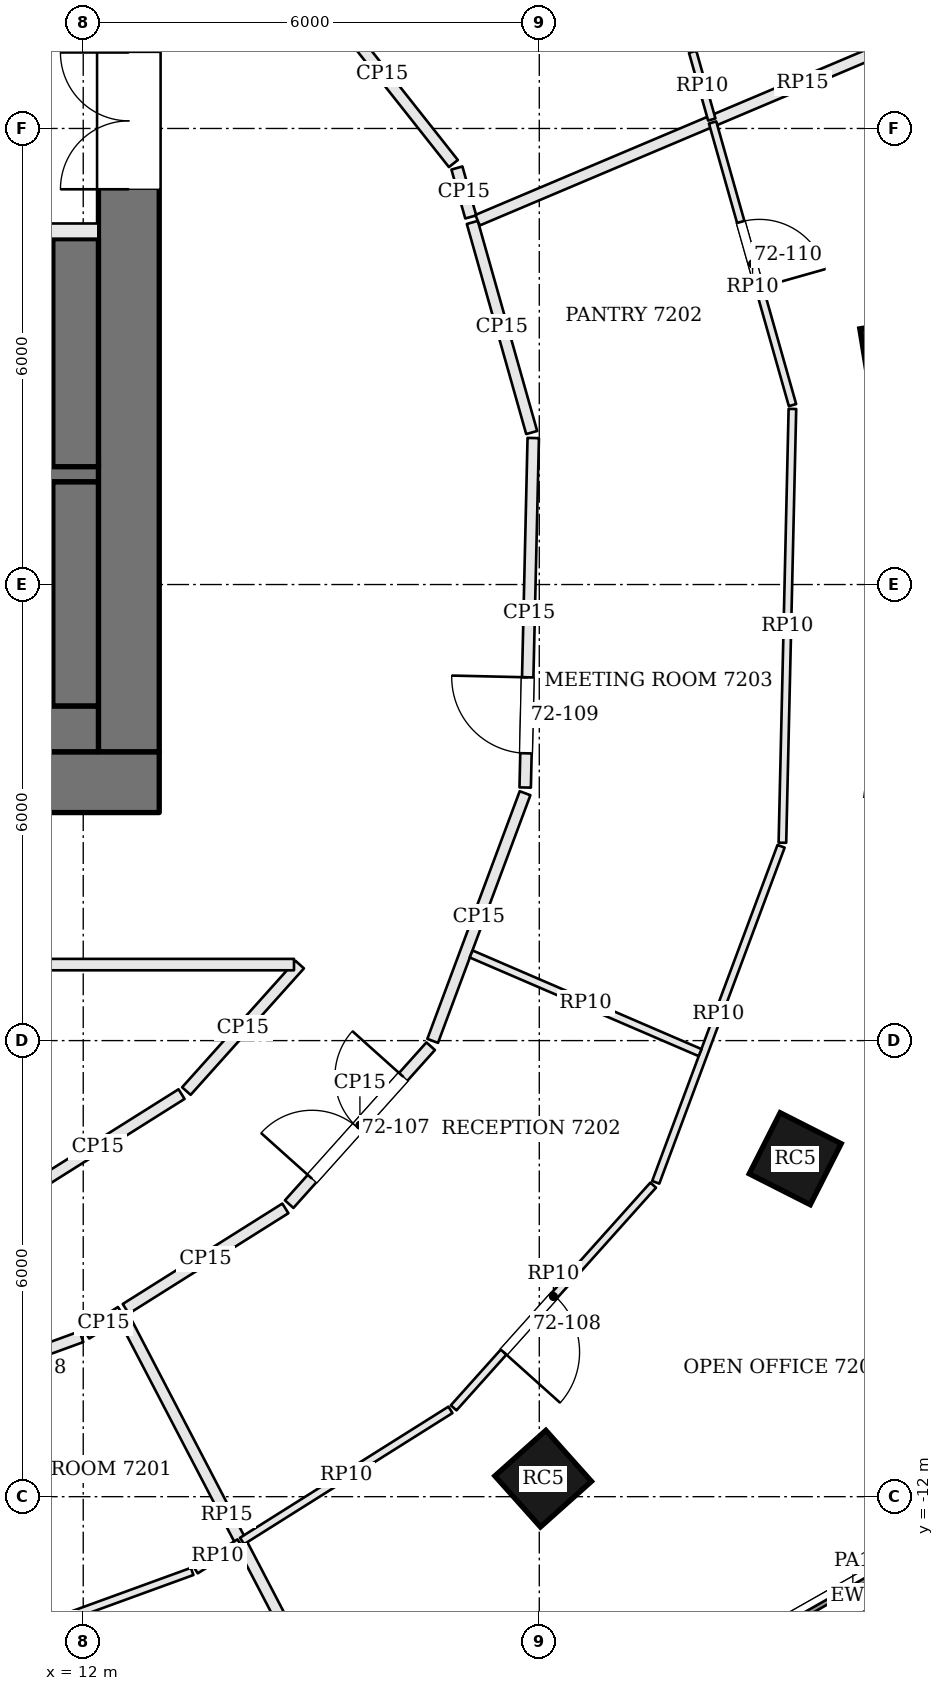
"""IFC4 building model, lengths in metres.
Left out: names, types, materials, properties, quantities, classifications, styles, units other than length and angle.
Written with IfcOpenShell. Run it as: python <this file> out.ifc"""

import sys

from ifc_helpers import new_model, si_unit, direction, frame, frame_2d, origin, origin_2d, place, context, subcontext, project, spatial, rectangle, extrude, element, fill, save


model = new_model("IFC4")
c1 = context("Model", 3, precision=1e-05, world=origin(), true_north=direction((0.0, 1.0)))
c2 = subcontext(c1, "Body", "Model", "MODEL_VIEW")
j1 = project(units=[si_unit("LENGTHUNIT", "METRE"), si_unit("PLANEANGLEUNIT", "RADIAN")], contexts=[c1])
p1 = place(None, origin())
s1 = spatial("IfcSite", under=j1, at=p1, CompositionType="ELEMENT")
p2 = place(p1, origin())
s2 = spatial("IfcBuilding", under=s1, at=p2, CompositionType="ELEMENT")
p3 = place(p2, frame((0.0, 0.0, 292.2)))
s3 = spatial("IfcBuildingStorey", under=s2, at=p3, CompositionType="ELEMENT", Elevation=292.2)
p4 = place(p3, frame((-13.0, -2.6, 0.0), z_axis=(0.0, 0.0, 1.0), x_axis=(1.0, 0.0, 0.0)))
e1 = element("IfcWall", 1, at=p4, inside=s3, PredefinedType="SHEAR", context=c2, shape_type="SweptSolid", body=[
    extrude(rectangle(XDim=26.0, YDim=0.8, at=frame_2d((13.0, 0.0))), origin(), (0.0, 0.0, 1.0), 3.9),
])
p5 = place(p4, frame((9.275, 0.0, 0.0)))
e2 = element("IfcOpeningElement", 2, at=p5, cuts=e1, PredefinedType="OPENING", context=c2, shape_type="SweptSolid", body=[
    extrude(rectangle(XDim=0.9, YDim=2.1, at=frame_2d((0.45, 1.05))), frame((0.0, 0.41, 0.0), z_axis=(0.0, -1.0, 0.0), x_axis=(1.0, 0.0, 0.0)), (0.0, 0.0, 1.0), 0.82),
])
p6 = place(p4, frame((11.75, 0.0, 0.0)))
e3 = element("IfcOpeningElement", 3, at=p6, cuts=e1, PredefinedType="OPENING", context=c2, shape_type="SweptSolid", body=[
    extrude(rectangle(XDim=1.0, YDim=2.1, at=frame_2d((0.5, 1.05))), frame((0.0, 0.41, 0.0), z_axis=(0.0, -1.0, 0.0), x_axis=(1.0, 0.0, 0.0)), (0.0, 0.0, 1.0), 0.82),
])
p7 = place(p4, frame((14.325, 0.0, 0.0)))
e4 = element("IfcOpeningElement", 4, at=p7, cuts=e1, PredefinedType="OPENING", context=c2, shape_type="SweptSolid", body=[
    extrude(rectangle(XDim=0.9, YDim=2.1, at=frame_2d((0.45, 1.05))), frame((0.0, 0.41, 0.0), z_axis=(0.0, -1.0, 0.0), x_axis=(1.0, 0.0, 0.0)), (0.0, 0.0, 1.0), 0.82),
])
p8 = place(p4, frame((16.7, 0.0, 0.0)))
e5 = element("IfcOpeningElement", 5, at=p8, cuts=e1, PredefinedType="OPENING", context=c2, shape_type="SweptSolid", body=[
    extrude(rectangle(XDim=0.9, YDim=2.1, at=frame_2d((0.45, 1.05))), frame((0.0, 0.41, 0.0), z_axis=(0.0, -1.0, 0.0), x_axis=(1.0, 0.0, 0.0)), (0.0, 0.0, 1.0), 0.82),
])
p9 = place(p3, frame((12.6, -2.2, 0.0), z_axis=(0.0, 0.0, 1.0), x_axis=(0.0, 1.0, 0.0)))
e6 = element("IfcWall", 6, at=p9, inside=s3, PredefinedType="SHEAR", context=c2, shape_type="SweptSolid", body=[
    extrude(rectangle(XDim=13.4, YDim=0.8, at=frame_2d((6.7, 0.0))), origin(), (0.0, 0.0, 1.0), 3.9),
])
p10 = place(p9, frame((7.4, 0.0, 0.0)))
e7 = element("IfcOpeningElement", 7, at=p10, cuts=e6, PredefinedType="OPENING", context=c2, shape_type="SweptSolid", body=[
    extrude(rectangle(XDim=1.8, YDim=2.1, at=frame_2d((0.9, 1.05))), frame((0.0, 0.41, 0.0), z_axis=(0.0, -1.0, 0.0), x_axis=(1.0, 0.0, 0.0)), (0.0, 0.0, 1.0), 0.82),
])
for number, where, z_axis, x_axis in (
    (8, (22.734, 2.993, 0.0), (0.0, 0.0, 1.0), (-0.162, 0.987, 0.0)),
    (9, (18.051, -11.763, 0.0), (0.0, 0.0, 1.0), (0.746, 0.666, 0.0)),
    (10, (21.367, -7.554, 0.0), (0.0, 0.0, 1.0), (0.452, 0.892, 0.0)),
):
    element("IfcColumn", number, at=place(p3, frame(where, z_axis=z_axis, x_axis=x_axis)), inside=s3, PredefinedType="COLUMN", context=c2, shape_type="SweptSolid", body=[
        extrude(rectangle(XDim=0.9, YDim=0.9, at=origin_2d()), origin(), (0.0, 0.0, 1.0), 3.9),
    ])
p11 = place(p3, frame((20.115, -14.455, 0.0), z_axis=(0.0, 0.0, 1.0), x_axis=(0.869822679286, 0.493364476427, 0.0)))
e11 = element("IfcWall", 11, at=p11, inside=s3, PredefinedType="SOLIDWALL", context=c2, shape_type="SweptSolid", body=[
    extrude(rectangle(XDim=4.638, YDim=0.45, at=frame_2d((2.319, 0.0))), origin(), (0.0, 0.0, 1.0), 3.7),
])
p12 = place(p11, frame((1.269, 0.0, 0.9)))
e12 = element("IfcOpeningElement", 12, at=p12, cuts=e11, PredefinedType="OPENING", context=c2, shape_type="SweptSolid", body=[
    extrude(rectangle(XDim=2.1, YDim=2.3, at=frame_2d((1.05, 1.15))), frame((0.0, 0.235, 0.0), z_axis=(0.0, -1.0, 0.0), x_axis=(1.0, 0.0, 0.0)), (0.0, 0.0, 1.0), 0.47),
])
p13 = place(p3, frame((20.195, -14.496, 3.9), z_axis=(0.0, 0.0, 1.0), x_axis=(0.86982311217, 0.493363713234, 0.0)))
e13 = element("IfcWall", 13, at=p13, inside=s3, PredefinedType="PARAPET", context=c2, shape_type="SweptSolid", body=[
    extrude(rectangle(XDim=4.438, YDim=0.3, at=frame_2d((2.219, 0.0))), origin(), (0.0, 0.0, 1.0), 1.1),
])
p14 = place(p3, frame((12.2, 4.65, 0.0), z_axis=(0.0, 0.0, 1.0), x_axis=(-1.0, 0.0, 0.0)))
e14 = element("IfcWall", 14, at=p14, inside=s3, PredefinedType="SOLIDWALL", context=c2, shape_type="SweptSolid", body=[
    extrude(rectangle(XDim=7.1, YDim=0.2, at=frame_2d((3.55, 0.0))), origin(), (0.0, 0.0, 1.0), 3.7),
])
p15 = place(p14, frame((4.4, 0.0, 0.0)))
e15 = element("IfcOpeningElement", 15, at=p15, cuts=e14, PredefinedType="OPENING", context=c2, shape_type="SweptSolid", body=[
    extrude(rectangle(XDim=1.2, YDim=2.1, at=frame_2d((0.6, 1.05))), frame((0.0, 0.11, 0.0), z_axis=(0.0, -1.0, 0.0), x_axis=(1.0, 0.0, 0.0)), (0.0, 0.0, 1.0), 0.22),
])
p16 = place(p14, frame((1.1, 0.0, 0.0)))
e16 = element("IfcOpeningElement", 16, at=p16, cuts=e14, PredefinedType="OPENING", context=c2, shape_type="SweptSolid", body=[
    extrude(rectangle(XDim=1.2, YDim=2.1, at=frame_2d((0.6, 1.05))), frame((0.0, 0.11, 0.0), z_axis=(0.0, -1.0, 0.0), x_axis=(1.0, 0.0, 0.0)), (0.0, 0.0, 1.0), 0.22),
])
p17 = place(p3, frame((12.2, 1.475, 0.0), z_axis=(0.0, 0.0, 1.0), x_axis=(-1.0, 0.0, 0.0)))
e17 = element("IfcWall", 17, at=p17, inside=s3, PredefinedType="SOLIDWALL", context=c2, shape_type="SweptSolid", body=[
    extrude(rectangle(XDim=7.1, YDim=0.25, at=frame_2d((3.55, 0.0))), origin(), (0.0, 0.0, 1.0), 3.7),
])
p18 = place(p17, frame((5.8, 0.0, 0.0)))
e18 = element("IfcOpeningElement", 18, at=p18, cuts=e17, PredefinedType="OPENING", context=c2, shape_type="SweptSolid", body=[
    extrude(rectangle(XDim=1.2, YDim=2.1, at=frame_2d((0.6, 1.05))), frame((0.0, 0.135, 0.0), z_axis=(0.0, -1.0, 0.0), x_axis=(1.0, 0.0, 0.0)), (0.0, 0.0, 1.0), 0.27),
])
p19 = place(p3, frame((11.9, 4.55, 0.0), z_axis=(0.0, 0.0, 1.0), x_axis=(0.0, -1.0, 0.0)))
e19 = element("IfcWall", 19, at=p19, inside=s3, PredefinedType="SOLIDWALL", context=c2, shape_type="SweptSolid", body=[
    extrude(rectangle(XDim=3.0, YDim=0.6, at=frame_2d((1.5, 0.0))), origin(), (0.0, 0.0, 1.0), 3.7),
])
p20 = place(p3, frame((11.9, 1.35, 0.0), z_axis=(0.0, 0.0, 1.0), x_axis=(0.0, -1.0, 0.0)))
e20 = element("IfcWall", 20, at=p20, inside=s3, PredefinedType="SOLIDWALL", context=c2, shape_type="SweptSolid", body=[
    extrude(rectangle(XDim=2.95, YDim=0.6, at=frame_2d((1.475, 0.0))), origin(), (0.0, 0.0, 1.0), 3.7),
])
p21 = place(p3, frame((12.2, -1.9, 0.0), z_axis=(0.0, 0.0, 1.0), x_axis=(-1.0, 0.0, 0.0)))
e21 = element("IfcWall", 21, at=p21, inside=s3, PredefinedType="SOLIDWALL", context=c2, shape_type="SweptSolid", body=[
    extrude(rectangle(XDim=7.1, YDim=0.6, at=frame_2d((3.55, 0.0))), origin(), (0.0, 0.0, 1.0), 3.7),
])
p22 = place(p3, frame((8.86, -11.03, 0.0), z_axis=(0.0, 0.0, 1.0), x_axis=(0.939685902536, 0.342038601001, 0.0)))
e22 = element("IfcWall", 22, at=p22, inside=s3, PredefinedType="PARTITIONING", context=c2, shape_type="SweptSolid", body=[
    extrude(rectangle(XDim=3.316, YDim=0.15, at=frame_2d((1.658, 0.0))), origin(), (0.0, 0.0, 1.0), 3.198),
])
p23 = place(p22, frame((1.65, 0.0, 0.0)))
e23 = element("IfcOpeningElement", 23, at=p23, cuts=e22, PredefinedType="OPENING", context=c2, shape_type="SweptSolid", body=[
    extrude(rectangle(XDim=0.9, YDim=2.1, at=frame_2d((0.45, 1.05))), frame((0.0, 0.085, 0.0), z_axis=(0.0, -1.0, 0.0), x_axis=(1.0, 0.0, 0.0)), (0.0, 0.0, 1.0), 0.17),
])
p24 = place(p3, frame((12.04, -9.856, 0.0), z_axis=(0.0, 0.0, 1.0), x_axis=(0.846240393033, 0.532801273647, 0.0)))
e24 = element("IfcWall", 24, at=p24, inside=s3, PredefinedType="PARTITIONING", context=c2, shape_type="SweptSolid", body=[
    extrude(rectangle(XDim=0.54, YDim=0.15, at=frame_2d((0.27, 0.0))), origin(), (0.0, 0.0, 1.0), 3.198),
])
p25 = place(p3, frame((15.244, -14.841, 0.0), z_axis=(0.0, 0.0, 1.0), x_axis=(-0.462122511499, 0.886816093881, 0.0)))
e25 = element("IfcWall", 25, at=p25, inside=s3, PredefinedType="PARTITIONING", context=c2, shape_type="SweptSolid", body=[
    extrude(rectangle(XDim=5.871, YDim=0.15, at=frame_2d((2.935, 0.0))), origin(), (0.0, 0.0, 1.0), 3.234),
])
p26 = place(p3, frame((12.56, -9.529, 0.0), z_axis=(0.0, 0.0, 1.0), x_axis=(0.846402081662, 0.53254437952, 0.0)))
e26 = element("IfcWall", 26, at=p26, inside=s3, PredefinedType="PARTITIONING", context=c2, shape_type="SweptSolid", body=[
    extrude(rectangle(XDim=2.481, YDim=0.15, at=frame_2d((1.24, 0.0))), origin(), (0.0, 0.0, 1.0), 3.198),
])
p27 = place(p3, frame((14.709, -8.152, 0.0), z_axis=(0.0, 0.0, 1.0), x_axis=(0.667275630306, 0.744810870758, 0.0)))
e27 = element("IfcWall", 27, at=p27, inside=s3, PredefinedType="PARTITIONING", context=c2, shape_type="SweptSolid", body=[
    extrude(rectangle(XDim=2.79, YDim=0.15, at=frame_2d((1.395, 0.0))), origin(), (0.0, 0.0, 1.0), 3.198),
])
p28 = place(p27, frame((0.45, 0.0, 0.0)))
e28 = element("IfcOpeningElement", 28, at=p28, cuts=e27, PredefinedType="OPENING", context=c2, shape_type="SweptSolid", body=[
    extrude(rectangle(XDim=1.8, YDim=2.1, at=frame_2d((0.9, 1.05))), frame((0.0, 0.085, 0.0), z_axis=(0.0, -1.0, 0.0), x_axis=(1.0, 0.0, 0.0)), (0.0, 0.0, 1.0), 0.17),
])
p29 = place(p3, frame((16.597, -6.003, 0.0), z_axis=(0.0, 0.0, 1.0), x_axis=(0.349499455299, 0.936936567088, 0.0)))
e29 = element("IfcWall", 29, at=p29, inside=s3, PredefinedType="PARTITIONING", context=c2, shape_type="SweptSolid", body=[
    extrude(rectangle(XDim=3.477, YDim=0.15, at=frame_2d((1.739, 0.0))), origin(), (0.0, 0.0, 1.0), 3.198),
])
p30 = place(p3, frame((17.814, -2.67, 0.0), z_axis=(0.0, 0.0, 1.0), x_axis=(0.023038539091, 0.999734577634, 0.0)))
e30 = element("IfcWall", 30, at=p30, inside=s3, PredefinedType="PARTITIONING", context=c2, shape_type="SweptSolid", body=[
    extrude(rectangle(XDim=4.599, YDim=0.15, at=frame_2d((2.3, 0.0))), origin(), (0.0, 0.0, 1.0), 3.198),
])
p31 = place(p30, frame((0.45, 0.0, 0.0)))
e31 = element("IfcOpeningElement", 31, at=p31, cuts=e30, PredefinedType="OPENING", context=c2, shape_type="SweptSolid", body=[
    extrude(rectangle(XDim=1.0, YDim=2.4, at=frame_2d((0.5, 1.2))), frame((0.0, 0.085, 0.0), z_axis=(0.0, -1.0, 0.0), x_axis=(1.0, 0.0, 0.0)), (0.0, 0.0, 1.0), 0.17),
])
p32 = place(p3, frame((17.9, 2.0, 0.0), z_axis=(0.0, 0.0, 1.0), x_axis=(-0.271980959701, 0.962302633042, 0.0)))
e32 = element("IfcWall", 32, at=p32, inside=s3, PredefinedType="PARTITIONING", context=c2, shape_type="SweptSolid", body=[
    extrude(rectangle(XDim=2.873, YDim=0.15, at=frame_2d((1.436, 0.0))), origin(), (0.0, 0.0, 1.0), 3.198),
])
p33 = place(p3, frame((25.739, 8.408, 0.0), z_axis=(0.0, 0.0, 1.0), x_axis=(-0.92106014218, -0.389420357052, 0.0)))
e33 = element("IfcWall", 33, at=p33, inside=s3, PredefinedType="PARTITIONING", context=c2, shape_type="SweptSolid", body=[
    extrude(rectangle(XDim=9.284, YDim=0.15, at=frame_2d((4.642, 0.0))), origin(), (0.0, 0.0, 1.0), 3.234),
])
p34 = place(p3, frame((17.098, 4.836, 0.0), z_axis=(0.0, 0.0, 1.0), x_axis=(-0.271971703561, 0.962305249109, 0.0)))
e34 = element("IfcWall", 34, at=p34, inside=s3, PredefinedType="PARTITIONING", context=c2, shape_type="SweptSolid", body=[
    extrude(rectangle(XDim=0.669, YDim=0.15, at=frame_2d((0.334, 0.0))), origin(), (0.0, 0.0, 1.0), 3.198),
])
p35 = place(p3, frame((16.87, 5.539, 0.0), z_axis=(0.0, 0.0, 1.0), x_axis=(-0.620093074114, 0.784528252796, 0.0)))
e35 = element("IfcWall", 35, at=p35, inside=s3, PredefinedType="PARTITIONING", context=c2, shape_type="SweptSolid", body=[
    extrude(rectangle(XDim=3.015, YDim=0.15, at=frame_2d((1.508, 0.0))), origin(), (0.0, 0.0, 1.0), 3.198),
])
p36 = place(p3, frame((14.848, -5.0, 0.0), z_axis=(0.0, 0.0, 1.0), x_axis=(-0.667363249373, -0.744732363595, 0.0)))
e36 = element("IfcWall", 36, at=p36, inside=s3, PredefinedType="PARTITIONING", context=c2, shape_type="SweptSolid", body=[
    extrude(rectangle(XDim=2.234, YDim=0.15, at=frame_2d((1.117, 0.0))), origin(), (0.0, 0.0, 1.0), 3.198),
])
p37 = place(p3, frame((13.293, -6.704, 0.0), z_axis=(0.0, 0.0, 1.0), x_axis=(-0.84641299998, -0.532527026041, 0.0)))
e37 = element("IfcWall", 37, at=p37, inside=s3, PredefinedType="PARTITIONING", context=c2, shape_type="SweptSolid", body=[
    extrude(rectangle(XDim=2.602, YDim=0.15, at=frame_2d((1.301, 0.0))), origin(), (0.0, 0.0, 1.0), 3.198),
])
p38 = place(p3, frame((-14.789, -5.0, 0.0), z_axis=(0.0, 0.0, 1.0), x_axis=(1.0, 0.0, 0.0)))
e38 = element("IfcWall", 38, at=p38, inside=s3, PredefinedType="PARTITIONING", context=c2, shape_type="SweptSolid", body=[
    extrude(rectangle(XDim=29.562, YDim=0.15, at=frame_2d((14.781, 0.0))), origin(), (0.0, 0.0, 1.0), 3.198),
])
p39 = place(p38, frame((3.857, 0.0, 0.0)))
e39 = element("IfcOpeningElement", 39, at=p39, cuts=e38, PredefinedType="OPENING", context=c2, shape_type="SweptSolid", body=[
    extrude(rectangle(XDim=1.0, YDim=2.4, at=frame_2d((0.5, 1.2))), frame((0.0, 0.085, 0.0), z_axis=(0.0, -1.0, 0.0), x_axis=(1.0, 0.0, 0.0)), (0.0, 0.0, 1.0), 0.17),
])
p40 = place(p38, frame((14.289, 0.0, 0.0)))
e40 = element("IfcOpeningElement", 40, at=p40, cuts=e38, PredefinedType="OPENING", context=c2, shape_type="SweptSolid", body=[
    extrude(rectangle(XDim=1.0, YDim=2.1, at=frame_2d((0.5, 1.05))), frame((0.0, 0.085, 0.0), z_axis=(0.0, -1.0, 0.0), x_axis=(1.0, 0.0, 0.0)), (0.0, 0.0, 1.0), 0.17),
])
p41 = place(p38, frame((24.713, 0.0, 0.0)))
e41 = element("IfcOpeningElement", 41, at=p41, cuts=e38, PredefinedType="OPENING", context=c2, shape_type="SweptSolid", body=[
    extrude(rectangle(XDim=1.0, YDim=2.4, at=frame_2d((0.5, 1.2))), frame((0.0, 0.085, 0.0), z_axis=(0.0, -1.0, 0.0), x_axis=(1.0, 0.0, 0.0)), (0.0, 0.0, 1.0), 0.17),
])
p42 = place(p3, frame((14.056, -12.604, 0.0), z_axis=(0.0, 0.0, 1.0), x_axis=(-0.846544184051, -0.532318461496, 0.0)))
e42 = element("IfcWall", 42, at=p42, inside=s3, PredefinedType="PARTITIONING", context=c2, shape_type="SweptSolid", body=[
    extrude(rectangle(XDim=0.681, YDim=0.1, at=frame_2d((0.34, 0.0))), origin(), (0.0, 0.0, 1.0), 3.198),
])
p43 = place(p3, frame((13.433, -12.984, 0.0), z_axis=(0.0, 0.0, 1.0), x_axis=(-0.939673979614, -0.342071355182, 0.0)))
e43 = element("IfcWall", 43, at=p43, inside=s3, PredefinedType="PARTITIONING", context=c2, shape_type="SweptSolid", body=[
    extrude(rectangle(XDim=4.0, YDim=0.1, at=frame_2d((2.0, 0.0))), origin(), (0.0, 0.0, 1.0), 3.198),
])
p44 = place(p43, frame((2.85, 0.0, 0.0)))
e44 = element("IfcOpeningElement", 44, at=p44, cuts=e43, PredefinedType="OPENING", context=c2, shape_type="SweptSolid", body=[
    extrude(rectangle(XDim=0.9, YDim=2.1, at=frame_2d((0.45, 1.05))), frame((0.0, 0.06, 0.0), z_axis=(0.0, -1.0, 0.0), x_axis=(1.0, 0.0, 0.0)), (0.0, 0.0, 1.0), 0.12),
])
p45 = place(p3, frame((20.28, 6.079, 0.0), z_axis=(0.0, 0.0, 1.0), x_axis=(0.271974810721, -0.962304370942, 0.0)))
e45 = element("IfcWall", 45, at=p45, inside=s3, PredefinedType="PARTITIONING", context=c2, shape_type="SweptSolid", body=[
    extrude(rectangle(XDim=3.865, YDim=0.1, at=frame_2d((1.932, 0.0))), origin(), (0.0, 0.0, 1.0), 3.198),
])
p46 = place(p45, frame((1.36, 0.0, 0.0)))
e46 = element("IfcOpeningElement", 46, at=p46, cuts=e45, PredefinedType="OPENING", context=c2, shape_type="SweptSolid", body=[
    extrude(rectangle(XDim=0.9, YDim=2.1, at=frame_2d((0.45, 1.05))), frame((0.0, 0.06, 0.0), z_axis=(0.0, -1.0, 0.0), x_axis=(1.0, 0.0, 0.0)), (0.0, 0.0, 1.0), 0.12),
])
p47 = place(p3, frame((21.33, 2.31, 0.0), z_axis=(0.0, 0.0, 1.0), x_axis=(-0.023052695677, -0.9997342513, 0.0)))
e47 = element("IfcWall", 47, at=p47, inside=s3, PredefinedType="PARTITIONING", context=c2, shape_type="SweptSolid", body=[
    extrude(rectangle(XDim=5.708, YDim=0.1, at=frame_2d((2.854, 0.0))), origin(), (0.0, 0.0, 1.0), 3.198),
])
p48 = place(p3, frame((21.181, -3.443, 0.0), z_axis=(0.0, 0.0, 1.0), x_axis=(-0.349438657616, -0.936959243811, 0.0)))
e48 = element("IfcWall", 48, at=p48, inside=s3, PredefinedType="PARTITIONING", context=c2, shape_type="SweptSolid", body=[
    extrude(rectangle(XDim=4.718, YDim=0.1, at=frame_2d((2.359, 0.0))), origin(), (0.0, 0.0, 1.0), 3.198),
])
p49 = place(p3, frame((19.499, -7.901, 0.0), z_axis=(0.0, 0.0, 1.0), x_axis=(-0.667320762971, -0.744770433964, 0.0)))
e49 = element("IfcWall", 49, at=p49, inside=s3, PredefinedType="PARTITIONING", context=c2, shape_type="SweptSolid", body=[
    extrude(rectangle(XDim=3.934, YDim=0.1, at=frame_2d((1.967, 0.0))), origin(), (0.0, 0.0, 1.0), 3.198),
])
p50 = place(p49, frame((1.95, 0.0, 0.0)))
e50 = element("IfcOpeningElement", 50, at=p50, cuts=e49, PredefinedType="OPENING", context=c2, shape_type="SweptSolid", body=[
    extrude(rectangle(XDim=1.0, YDim=2.1, at=frame_2d((0.5, 1.05))), frame((0.0, 0.06, 0.0), z_axis=(0.0, -1.0, 0.0), x_axis=(1.0, 0.0, 0.0)), (0.0, 0.0, 1.0), 0.12),
])
p51 = place(p3, frame((16.831, -10.858, 0.0), z_axis=(0.0, 0.0, 1.0), x_axis=(-0.846427876971, -0.532503379413, 0.0)))
e51 = element("IfcWall", 51, at=p51, inside=s3, PredefinedType="PARTITIONING", context=c2, shape_type="SweptSolid", body=[
    extrude(rectangle(XDim=3.239, YDim=0.1, at=frame_2d((1.62, 0.0))), origin(), (0.0, 0.0, 1.0), 3.198),
])
p52 = place(p3, frame((17.104, -4.86, 0.0), z_axis=(0.0, 0.0, 1.0), x_axis=(0.918346015078, -0.395778469084, 0.0)))
e52 = element("IfcWall", 52, at=p52, inside=s3, PredefinedType="PARTITIONING", context=c2, shape_type="SweptSolid", body=[
    extrude(rectangle(XDim=3.279, YDim=0.1, at=frame_2d((1.64, 0.0))), origin(), (0.0, 0.0, 1.0), 3.198),
])
p53 = place(p3, frame((20.018, 7.008, 0.0), z_axis=(0.0, 0.0, 1.0), x_axis=(0.272036681058, -0.962286882462, 0.0)))
e53 = element("IfcWall", 53, at=p53, inside=s3, PredefinedType="PARTITIONING", context=c2, shape_type="SweptSolid", body=[
    extrude(rectangle(XDim=0.925, YDim=0.1, at=frame_2d((0.463, 0.0))), origin(), (0.0, 0.0, 1.0), 3.198),
])
p54 = place(p12, origin())
e54 = element("IfcWindow", 54, at=p54, inside=s3, PartitioningType="SINGLE_PANEL", PredefinedType="WINDOW", context=c2, shape_type="SweptSolid", body=[
    extrude(rectangle(XDim=2.1, YDim=2.3, at=frame_2d((1.05, 1.15))), frame((0.0, 0.135, 0.0), z_axis=(0.0, -1.0, 0.0), x_axis=(1.0, 0.0, 0.0)), (0.0, 0.0, 1.0), 0.06),
])
fill(e12, e54)
p55 = place(p10, origin())
e55 = element("IfcDoor", 55, at=p55, inside=s3, OperationType="DOUBLE_DOOR_SINGLE_SWING", PredefinedType="DOOR", context=c2, shape_type="SweptSolid", body=[
    extrude(rectangle(XDim=1.8, YDim=2.1, at=frame_2d((0.9, 1.05))), frame((0.0, 0.025, 0.0), z_axis=(0.0, -1.0, 0.0), x_axis=(1.0, 0.0, 0.0)), (0.0, 0.0, 1.0), 0.05),
])
fill(e7, e55)
p56 = place(p28, origin())
e56 = element("IfcDoor", 56, at=p56, inside=s3, OperationType="DOUBLE_DOOR_SINGLE_SWING", PredefinedType="DOOR", context=c2, shape_type="SweptSolid", body=[
    extrude(rectangle(XDim=1.8, YDim=2.1, at=frame_2d((0.9, 1.05))), frame((0.0, 0.025, 0.0), z_axis=(0.0, -1.0, 0.0), x_axis=(1.0, 0.0, 0.0)), (0.0, 0.0, 1.0), 0.05),
])
fill(e28, e56)
p57 = place(p50, origin())
e57 = element("IfcDoor", 57, at=p57, inside=s3, OperationType="SINGLE_SWING_RIGHT", PredefinedType="DOOR", context=c2, shape_type="SweptSolid", body=[
    extrude(rectangle(XDim=1.0, YDim=2.1, at=frame_2d((0.5, 1.05))), frame((0.0, 0.025, 0.0), z_axis=(0.0, -1.0, 0.0), x_axis=(1.0, 0.0, 0.0)), (0.0, 0.0, 1.0), 0.05),
])
fill(e50, e57)
p58 = place(p31, origin())
e58 = element("IfcDoor", 58, at=p58, inside=s3, OperationType="SINGLE_SWING_RIGHT", PredefinedType="DOOR", context=c2, shape_type="SweptSolid", body=[
    extrude(rectangle(XDim=1.0, YDim=2.4, at=frame_2d((0.5, 1.2))), frame((0.0, 0.025, 0.0), z_axis=(0.0, -1.0, 0.0), x_axis=(1.0, 0.0, 0.0)), (0.0, 0.0, 1.0), 0.05),
])
fill(e31, e58)
p59 = place(p46, origin())
e59 = element("IfcDoor", 59, at=p59, inside=s3, OperationType="SINGLE_SWING_RIGHT", PredefinedType="DOOR", context=c2, shape_type="SweptSolid", body=[
    extrude(rectangle(XDim=0.9, YDim=2.1, at=frame_2d((0.45, 1.05))), frame((0.0, 0.025, 0.0), z_axis=(0.0, -1.0, 0.0), x_axis=(1.0, 0.0, 0.0)), (0.0, 0.0, 1.0), 0.05),
])
fill(e46, e59)
save(model, sys.argv[1])
